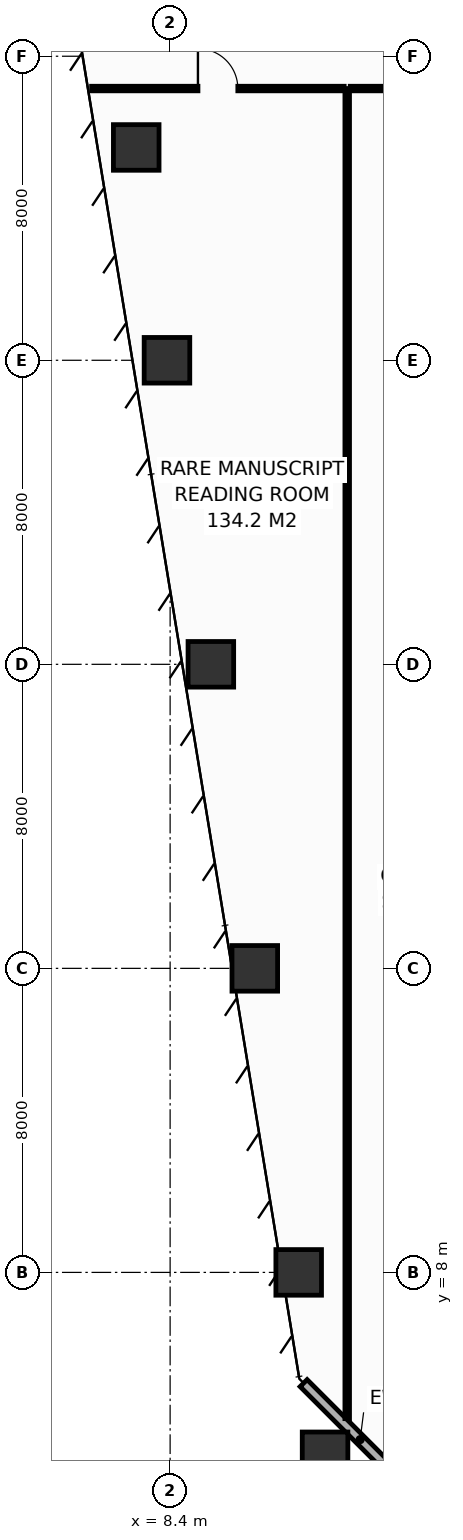
"""IFC4 building model, lengths in metres.
Left out: names, types, materials, properties, quantities, classifications, styles, units other than length and angle.
Written with IfcOpenShell. Run it as: python <this file> out.ifc"""

import sys

from ifc_helpers import new_model, si_unit, direction, frame, frame_2d, origin, origin_2d, place, context, subcontext, project, spatial, rectangle, hollow_rectangle, extrude, element, fill, save


model = new_model("IFC4")
c1 = context("Model", 3, precision=1e-05, world=origin(), true_north=direction((0.0, 1.0)))
c2 = subcontext(c1, "Body", "Model", "MODEL_VIEW")
j1 = project(units=[si_unit("LENGTHUNIT", "METRE"), si_unit("PLANEANGLEUNIT", "RADIAN")], contexts=[c1])
p1 = place(None, origin())
s1 = spatial("IfcSite", under=j1, at=p1, CompositionType="ELEMENT")
p2 = place(p1, origin())
s2 = spatial("IfcBuilding", under=s1, at=p2, CompositionType="ELEMENT")
p3 = place(p2, frame((0.0, 0.0, 42.8)))
s3 = spatial("IfcBuildingStorey", under=s2, at=p3, CompositionType="ELEMENT", Elevation=42.8)
for number, where, z_axis, x_axis in (
    (1, (12.477, 3.2, 0.0), (0.0, 0.0, 1.0), (1.0, 0.0, 0.0)),
    (2, (11.783, 8.0, 0.0), (0.0, 0.0, 1.0), (1.0, 0.0, 0.0)),
    (3, (10.628, 16.0, 0.0), (0.0, 0.0, 1.0), (1.0, 0.0, 0.0)),
    (4, (9.472, 24.0, 0.0), (0.0, 0.0, 1.0), (1.0, 0.0, 0.0)),
    (5, (8.317, 32.0, 0.0), (0.0, 0.0, 1.0), (1.0, 0.0, 0.0)),
    (6, (7.508, 37.6, 0.0), (0.0, 0.0, 1.0), (1.0, 0.0, 0.0)),
):
    element("IfcColumn", number, at=place(p3, frame(where, z_axis=z_axis, x_axis=x_axis)), inside=s3, PredefinedType="COLUMN", context=c2, shape_type="SweptSolid", body=[
        extrude(hollow_rectangle(XDim=1.2, YDim=1.2, WallThickness=0.055, at=origin_2d()), origin(), (0.0, 0.0, 1.0), 4.4),
    ])
p4 = place(p3, frame((11.913, 5.087, 0.0), z_axis=(0.0, 0.0, 1.0), x_axis=(0.707106781187, -0.707106781187, 0.0)))
e7 = element("IfcWall", 7, at=p4, inside=s3, PredefinedType="STANDARD", context=c2, shape_type="SweptSolid", body=[
    extrude(rectangle(XDim=4.206, YDim=0.26, at=frame_2d((2.103, 0.0))), origin(), (0.0, 0.0, 1.0), 4.15),
])
p5 = place(p3, frame((13.06, 4.152, 0.0), z_axis=(0.0, 0.0, 1.0), x_axis=(0.0, 1.0, 0.0)))
e8 = element("IfcWall", 8, at=p5, inside=s3, PredefinedType="PARTITIONING", context=c2, shape_type="SweptSolid", body=[
    extrude(rectangle(XDim=34.998, YDim=0.12, at=frame_2d((17.499, 0.0))), origin(), (0.0, 0.0, 1.0), 3.335),
])
p6 = place(p3, frame((6.334, 39.15, 0.0), z_axis=(0.0, 0.0, 1.0), x_axis=(1.0, 0.0, 0.0)))
e9 = element("IfcWall", 9, at=p6, inside=s3, PredefinedType="PARTITIONING", context=c2, shape_type="SweptSolid", body=[
    extrude(rectangle(XDim=6.646, YDim=0.12, at=frame_2d((3.323, 0.0))), origin(), (0.0, 0.0, 1.0), 3.635),
])
p7 = place(p6, frame((2.798, 0.0, 0.0)))
e10 = element("IfcOpeningElement", 10, at=p7, cuts=e9, PredefinedType="OPENING", context=c2, shape_type="SweptSolid", body=[
    extrude(rectangle(XDim=1.05, YDim=2.15, at=frame_2d((0.525, 1.075))), frame((0.0, 0.07, 0.0), z_axis=(0.0, -1.0, 0.0), x_axis=(1.0, 0.0, 0.0)), (0.0, 0.0, 1.0), 0.14),
])
p8 = place(p3, frame((13.14, 39.15, 0.0), z_axis=(0.0, 0.0, 1.0), x_axis=(1.0, 0.0, 0.0)))
e11 = element("IfcWall", 11, at=p8, inside=s3, PredefinedType="PARTITIONING", context=c2, shape_type="SweptSolid", body=[
    extrude(rectangle(XDim=5.58, YDim=0.12, at=frame_2d((2.79, 0.0))), origin(), (0.0, 0.0, 1.0), 4.15),
])
p9 = place(p8, frame((2.265, 0.0, 0.0)))
e12 = element("IfcOpeningElement", 12, at=p9, cuts=e11, PredefinedType="OPENING", context=c2, shape_type="SweptSolid", body=[
    extrude(rectangle(XDim=1.05, YDim=2.15, at=frame_2d((0.525, 1.075))), frame((0.0, 0.07, 0.0), z_axis=(0.0, -1.0, 0.0), x_axis=(1.0, 0.0, 0.0)), (0.0, 0.0, 1.0), 0.14),
])
p10 = place(p7, origin())
e13 = element("IfcDoor", 13, at=p10, inside=s3, OperationType="SINGLE_SWING_LEFT", PredefinedType="DOOR", context=c2, shape_type="SweptSolid", body=[
    extrude(rectangle(XDim=1.05, YDim=2.15, at=frame_2d((0.525, 1.075))), frame((0.0, 0.025, 0.0), z_axis=(0.0, -1.0, 0.0), x_axis=(1.0, 0.0, 0.0)), (0.0, 0.0, 1.0), 0.05),
])
fill(e10, e13)
save(model, sys.argv[1])
